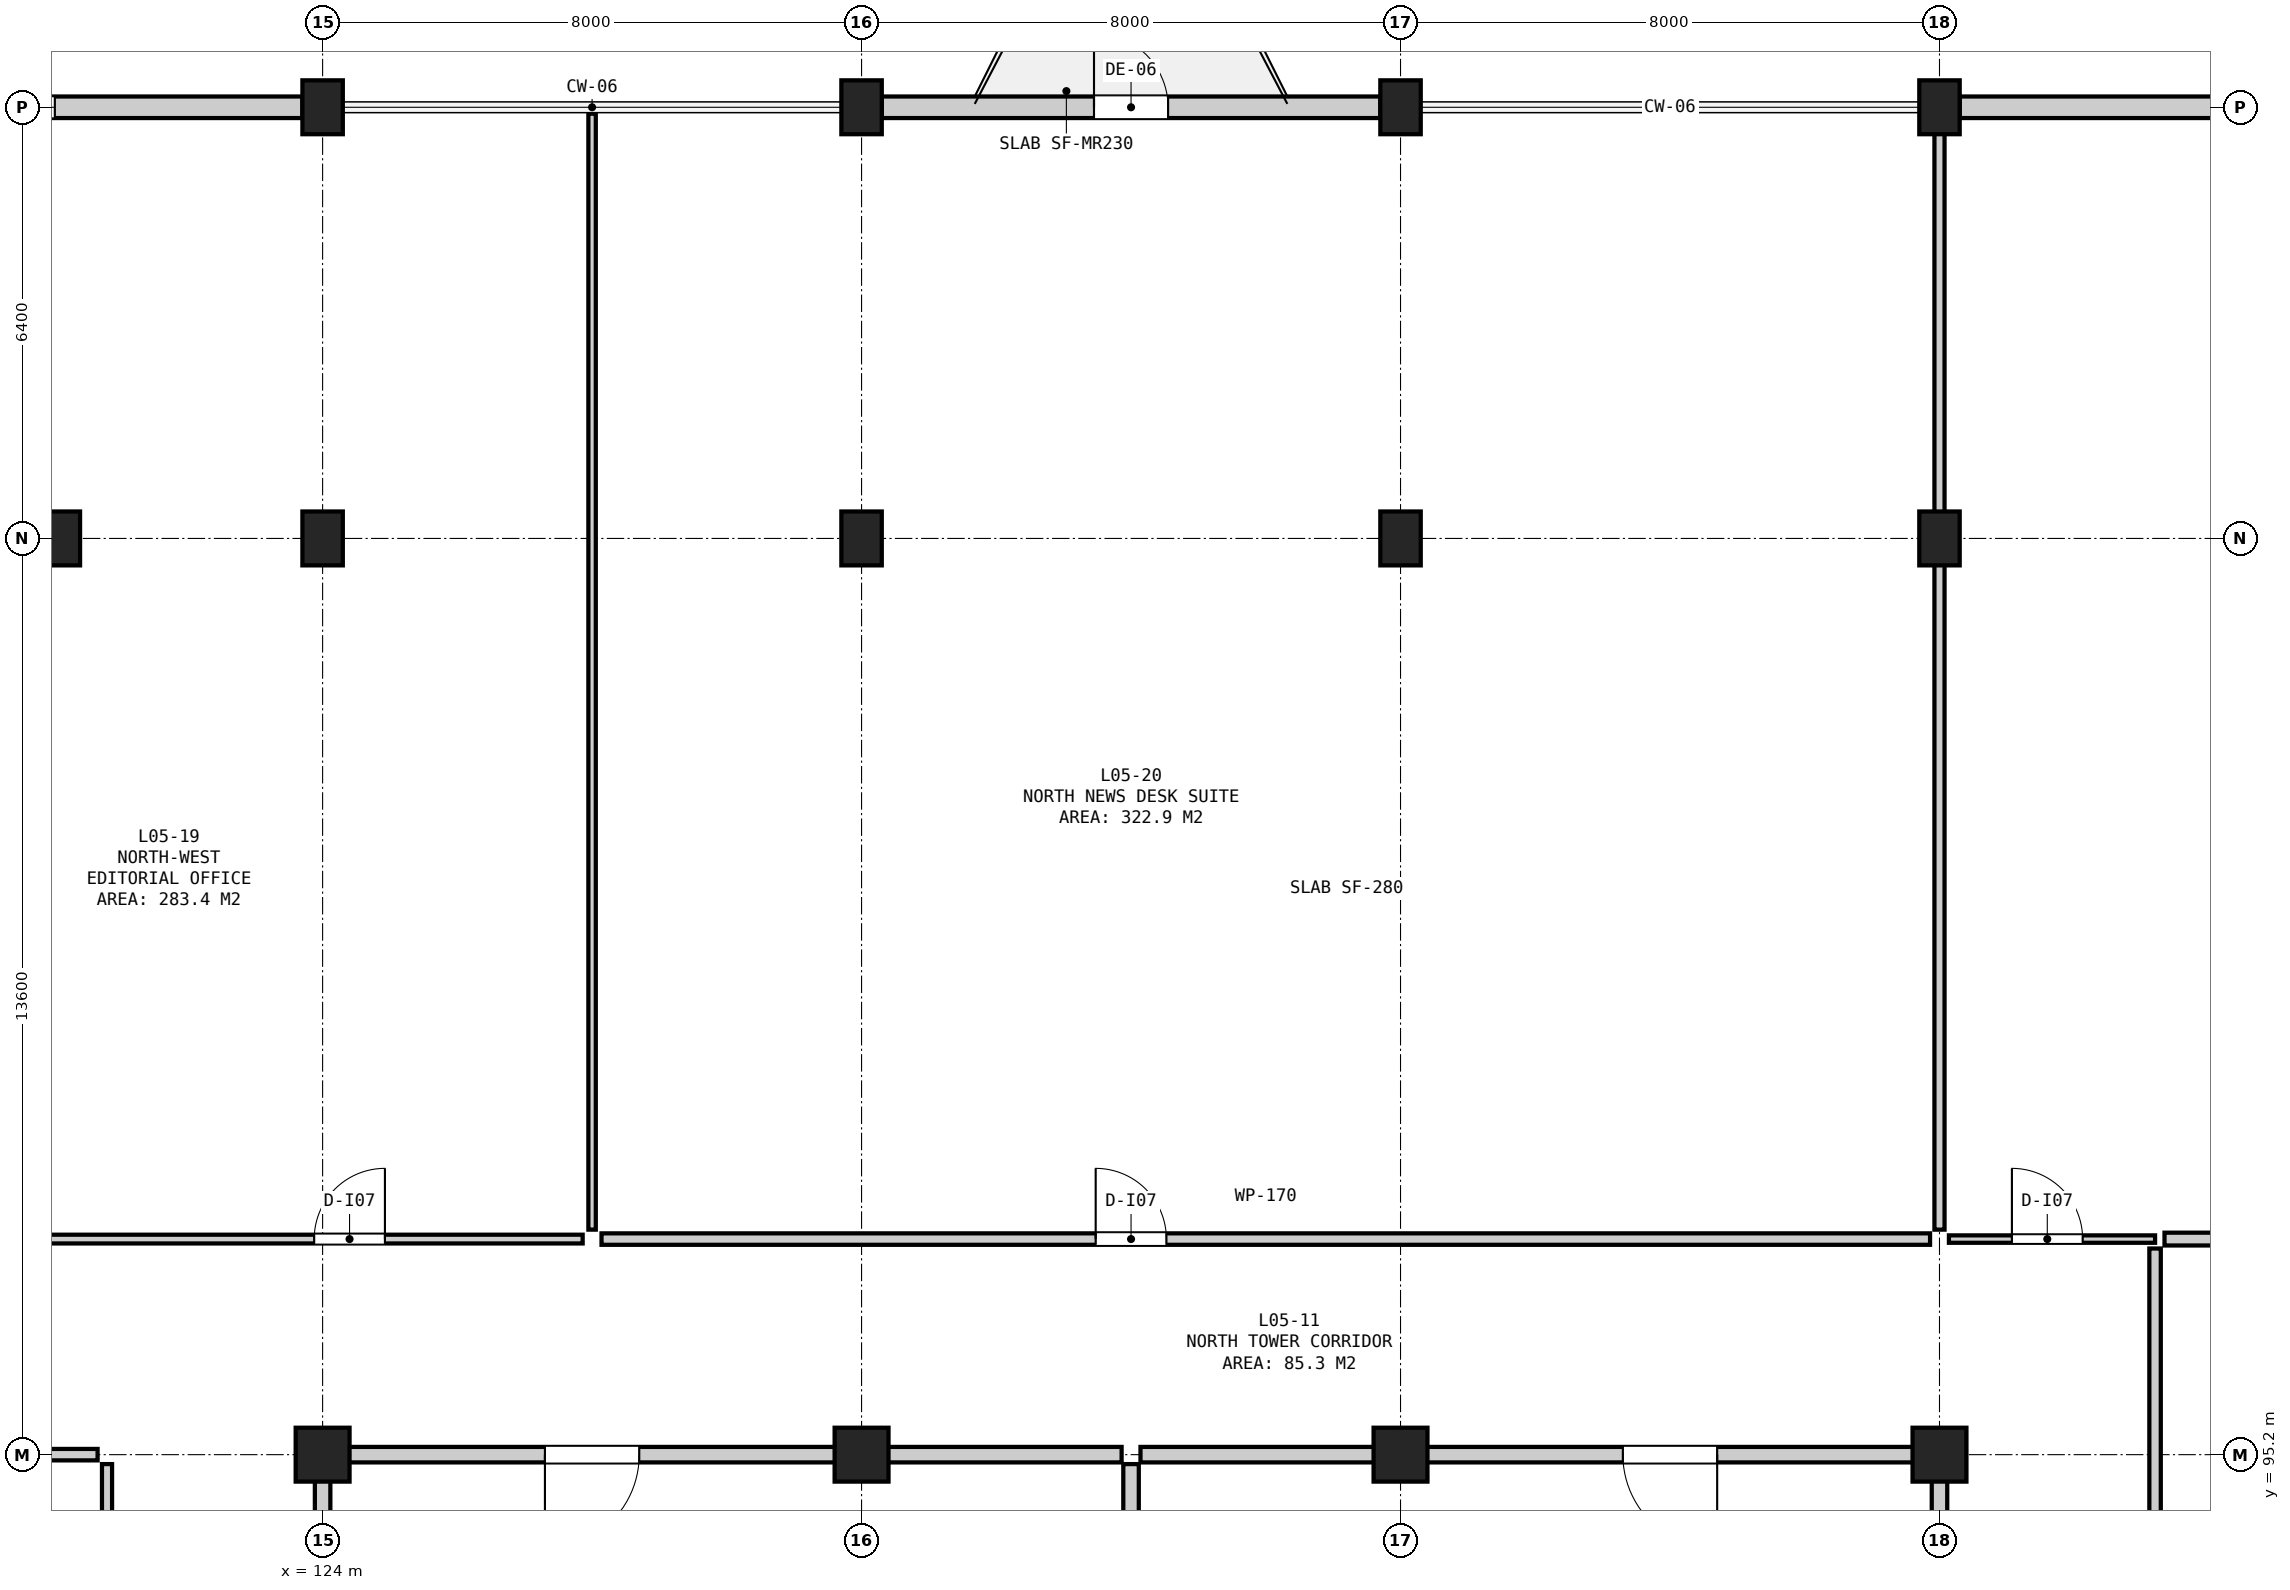
"""IFC4 building model, lengths in metres.
Left out: names, types, materials, properties, quantities, classifications, styles, units other than length and angle.
Written with IfcOpenShell. Run it as: python <this file> out.ifc"""

import sys

from ifc_helpers import new_model, si_unit, direction, frame, frame_2d, origin, origin_2d, place, context, subcontext, project, spatial, rectangle, circle, extrude, element, fill, save


model = new_model("IFC4")
c1 = context("Model", 3, precision=1e-05, world=origin(), true_north=direction((0.0, 1.0)))
c2 = subcontext(c1, "Body", "Model", "MODEL_VIEW")
j1 = project(units=[si_unit("LENGTHUNIT", "METRE"), si_unit("PLANEANGLEUNIT", "RADIAN")], contexts=[c1])
p1 = place(None, origin())
s1 = spatial("IfcSite", under=j1, at=p1, CompositionType="ELEMENT")
p2 = place(p1, origin())
s2 = spatial("IfcBuilding", under=s1, at=p2, CompositionType="ELEMENT")
p3 = place(p2, frame((0.0, 0.0, 23.8)))
s3 = spatial("IfcBuildingStorey", under=s2, at=p3, CompositionType="ELEMENT", Elevation=23.8)
p4 = place(p3, frame((120.0, 108.8, 0.0), z_axis=(0.0, 0.0, 1.0), x_axis=(1.0, 0.0, 0.0)))
e1 = element("IfcColumn", 1, at=p4, inside=s3, PredefinedType="COLUMN", context=c2, shape_type="SweptSolid", body=[
    extrude(circle(Radius=0.4, at=origin_2d()), origin(), (0.0, 0.0, 1.0), 4.0),
])
p5 = place(p3, frame((124.0, 95.2, 0.0), z_axis=(0.0, 0.0, 1.0), x_axis=(1.0, 0.0, 0.0)))
e2 = element("IfcColumn", 2, at=p5, inside=s3, PredefinedType="COLUMN", context=c2, shape_type="SweptSolid", body=[
    extrude(rectangle(XDim=0.8, YDim=0.8, at=origin_2d()), origin(), (0.0, 0.0, 1.0), 4.0),
])
for number, where, z_axis, x_axis in (
    (3, (124.0, 108.8, 0.0), (0.0, 0.0, 1.0), (1.0, 0.0, 0.0)),
    (4, (124.0, 115.2, 0.0), (0.0, 0.0, 1.0), (1.0, 0.0, 0.0)),
):
    element("IfcColumn", number, at=place(p3, frame(where, z_axis=z_axis, x_axis=x_axis)), inside=s3, PredefinedType="COLUMN", context=c2, shape_type="SweptSolid", body=[
        extrude(rectangle(XDim=0.6, YDim=0.8, at=origin_2d()), origin(), (0.0, 0.0, 1.0), 4.0),
    ])
p6 = place(p3, frame((132.0, 95.2, 0.0), z_axis=(0.0, 0.0, 1.0), x_axis=(1.0, 0.0, 0.0)))
e5 = element("IfcColumn", 5, at=p6, inside=s3, PredefinedType="COLUMN", context=c2, shape_type="SweptSolid", body=[
    extrude(rectangle(XDim=0.8, YDim=0.8, at=origin_2d()), origin(), (0.0, 0.0, 1.0), 4.0),
])
for number, where, z_axis, x_axis in (
    (6, (132.0, 108.8, 0.0), (0.0, 0.0, 1.0), (1.0, 0.0, 0.0)),
    (7, (132.0, 115.2, 0.0), (0.0, 0.0, 1.0), (1.0, 0.0, 0.0)),
):
    element("IfcColumn", number, at=place(p3, frame(where, z_axis=z_axis, x_axis=x_axis)), inside=s3, PredefinedType="COLUMN", context=c2, shape_type="SweptSolid", body=[
        extrude(rectangle(XDim=0.6, YDim=0.8, at=origin_2d()), origin(), (0.0, 0.0, 1.0), 4.0),
    ])
p7 = place(p3, frame((140.0, 95.2, 0.0), z_axis=(0.0, 0.0, 1.0), x_axis=(1.0, 0.0, 0.0)))
e8 = element("IfcColumn", 8, at=p7, inside=s3, PredefinedType="COLUMN", context=c2, shape_type="SweptSolid", body=[
    extrude(rectangle(XDim=0.8, YDim=0.8, at=origin_2d()), origin(), (0.0, 0.0, 1.0), 4.0),
])
for number, where, z_axis, x_axis in (
    (9, (140.0, 108.8, 0.0), (0.0, 0.0, 1.0), (1.0, 0.0, 0.0)),
    (10, (140.0, 115.2, 0.0), (0.0, 0.0, 1.0), (1.0, 0.0, 0.0)),
):
    element("IfcColumn", number, at=place(p3, frame(where, z_axis=z_axis, x_axis=x_axis)), inside=s3, PredefinedType="COLUMN", context=c2, shape_type="SweptSolid", body=[
        extrude(rectangle(XDim=0.6, YDim=0.8, at=origin_2d()), origin(), (0.0, 0.0, 1.0), 4.0),
    ])
p8 = place(p3, frame((148.0, 95.2, 0.0), z_axis=(0.0, 0.0, 1.0), x_axis=(1.0, 0.0, 0.0)))
e11 = element("IfcColumn", 11, at=p8, inside=s3, PredefinedType="COLUMN", context=c2, shape_type="SweptSolid", body=[
    extrude(rectangle(XDim=0.8, YDim=0.8, at=origin_2d()), origin(), (0.0, 0.0, 1.0), 4.0),
])
for number, where, z_axis, x_axis in (
    (12, (148.0, 108.8, 0.0), (0.0, 0.0, 1.0), (1.0, 0.0, 0.0)),
    (13, (148.0, 115.2, 0.0), (0.0, 0.0, 1.0), (1.0, 0.0, 0.0)),
):
    element("IfcColumn", number, at=place(p3, frame(where, z_axis=z_axis, x_axis=x_axis)), inside=s3, PredefinedType="COLUMN", context=c2, shape_type="SweptSolid", body=[
        extrude(rectangle(XDim=0.6, YDim=0.8, at=origin_2d()), origin(), (0.0, 0.0, 1.0), 4.0),
    ])
p9 = place(p3, frame((161.3, 115.2, 0.0), z_axis=(0.0, 0.0, 1.0), x_axis=(-1.0, 0.0, 0.0)))
e14 = element("IfcWall", 14, at=p9, inside=s3, PredefinedType="SOLIDWALL", context=c2, shape_type="SweptSolid", body=[
    extrude(rectangle(XDim=13.0, YDim=0.32, at=frame_2d((6.5, 0.0))), origin(), (0.0, 0.0, 1.0), 2.685),
])
p10 = place(p9, frame((6.025, 0.0, 0.8)))
e15 = element("IfcOpeningElement", 15, at=p10, cuts=e14, PredefinedType="OPENING", context=c2, shape_type="SweptSolid", body=[
    extrude(rectangle(XDim=0.95, YDim=1.45, at=frame_2d((0.475, 0.725))), frame((0.0, 0.172, 0.0), z_axis=(0.0, -1.0, 0.0), x_axis=(1.0, 0.0, 0.0)), (0.0, 0.0, 1.0), 0.344),
])
p11 = place(p3, frame((139.7, 115.2, 0.0), z_axis=(0.0, 0.0, 1.0), x_axis=(-1.0, 0.0, 0.0)))
e16 = element("IfcWall", 16, at=p11, inside=s3, PredefinedType="SOLIDWALL", context=c2, shape_type="SweptSolid", body=[
    extrude(rectangle(XDim=7.4, YDim=0.32, at=frame_2d((3.7, 0.0))), origin(), (0.0, 0.0, 1.0), 3.1),
])
p12 = place(p11, frame((3.15, 0.0, 0.0)))
e17 = element("IfcOpeningElement", 17, at=p12, cuts=e16, PredefinedType="OPENING", context=c2, shape_type="SweptSolid", body=[
    extrude(rectangle(XDim=1.1, YDim=2.2, at=frame_2d((0.55, 1.1))), frame((0.0, 0.172, 0.0), z_axis=(0.0, -1.0, 0.0), x_axis=(1.0, 0.0, 0.0)), (0.0, 0.0, 1.0), 0.344),
])
p13 = place(p3, frame((123.7, 115.2, 0.0), z_axis=(0.0, 0.0, 1.0), x_axis=(-1.0, 0.0, 0.0)))
e18 = element("IfcWall", 18, at=p13, inside=s3, PredefinedType="SOLIDWALL", context=c2, shape_type="SweptSolid", body=[
    extrude(rectangle(XDim=6.6, YDim=0.32, at=frame_2d((3.3, 0.0))), origin(), (0.0, 0.0, 1.0), 3.1),
])
p14 = place(p13, frame((3.675, 0.0, 0.9)))
e19 = element("IfcOpeningElement", 19, at=p14, cuts=e18, PredefinedType="OPENING", context=c2, shape_type="SweptSolid", body=[
    extrude(rectangle(XDim=0.95, YDim=1.45, at=frame_2d((0.475, 0.725))), frame((0.0, 0.172, 0.0), z_axis=(0.0, -1.0, 0.0), x_axis=(1.0, 0.0, 0.0)), (0.0, 0.0, 1.0), 0.344),
])
p15 = place(p3, frame((124.14, 95.2, 0.0), z_axis=(0.0, 0.0, 1.0), x_axis=(1.0, 0.0, 0.0)))
e20 = element("IfcWall", 20, at=p15, inside=s3, PredefinedType="SOLIDWALL", context=c2, shape_type="SweptSolid", body=[
    extrude(rectangle(XDim=11.72, YDim=0.23, at=frame_2d((5.86, 0.0))), origin(), (0.0, 0.0, 1.0), 2.945),
])
p16 = place(p15, frame((3.16, 0.0, 0.0)))
e21 = element("IfcOpeningElement", 21, at=p16, cuts=e20, PredefinedType="OPENING", context=c2, shape_type="SweptSolid", body=[
    extrude(rectangle(XDim=1.4, YDim=2.2, at=frame_2d((0.7, 1.1))), frame((0.0, 0.127, 0.0), z_axis=(0.0, -1.0, 0.0), x_axis=(1.0, 0.0, 0.0)), (0.0, 0.0, 1.0), 0.254),
])
p17 = place(p3, frame((124.0, 91.54, 0.0), z_axis=(0.0, 0.0, 1.0), x_axis=(0.0, 1.0, 0.0)))
e22 = element("IfcWall", 22, at=p17, inside=s3, PredefinedType="SOLIDWALL", context=c2, shape_type="SweptSolid", body=[
    extrude(rectangle(XDim=3.52, YDim=0.23, at=frame_2d((1.76, 0.0))), origin(), (0.0, 0.0, 1.0), 3.095),
])
p18 = place(p3, frame((136.0, 91.54, 0.0), z_axis=(0.0, 0.0, 1.0), x_axis=(0.0, 1.0, 0.0)))
e23 = element("IfcWall", 23, at=p18, inside=s3, PredefinedType="SOLIDWALL", context=c2, shape_type="SweptSolid", body=[
    extrude(rectangle(XDim=3.52, YDim=0.23, at=frame_2d((1.76, 0.0))), origin(), (0.0, 0.0, 1.0), 3.72),
])
p19 = place(p3, frame((136.14, 95.2, 0.0), z_axis=(0.0, 0.0, 1.0), x_axis=(1.0, 0.0, 0.0)))
e24 = element("IfcWall", 24, at=p19, inside=s3, PredefinedType="SOLIDWALL", context=c2, shape_type="SweptSolid", body=[
    extrude(rectangle(XDim=11.72, YDim=0.23, at=frame_2d((5.86, 0.0))), origin(), (0.0, 0.0, 1.0), 2.995),
])
p20 = place(p19, frame((7.16, 0.0, 0.0)))
e25 = element("IfcOpeningElement", 25, at=p20, cuts=e24, PredefinedType="OPENING", context=c2, shape_type="SweptSolid", body=[
    extrude(rectangle(XDim=1.4, YDim=2.2, at=frame_2d((0.7, 1.1))), frame((0.0, 0.127, 0.0), z_axis=(0.0, -1.0, 0.0), x_axis=(1.0, 0.0, 0.0)), (0.0, 0.0, 1.0), 0.254),
])
p21 = place(p3, frame((148.0, 91.54, 0.0), z_axis=(0.0, 0.0, 1.0), x_axis=(0.0, 1.0, 0.0)))
e26 = element("IfcWall", 26, at=p21, inside=s3, PredefinedType="SOLIDWALL", context=c2, shape_type="SweptSolid", body=[
    extrude(rectangle(XDim=3.52, YDim=0.23, at=frame_2d((1.76, 0.0))), origin(), (0.0, 0.0, 1.0), 2.945),
])
p22 = place(p3, frame((110.24, 95.2, 0.0), z_axis=(0.0, 0.0, 1.0), x_axis=(1.0, 0.0, 0.0)))
e27 = element("IfcWall", 27, at=p22, inside=s3, PredefinedType="PARTITIONING", context=c2, shape_type="SweptSolid", body=[
    extrude(rectangle(XDim=10.42, YDim=0.17, at=frame_2d((5.21, 0.0))), origin(), (0.0, 0.0, 1.0), 3.195),
])
p23 = place(p3, frame((120.8, 65.775, 0.0), z_axis=(0.0, 0.0, 1.0), x_axis=(0.0, 1.0, 0.0)))
e28 = element("IfcWall", 28, at=p23, inside=s3, PredefinedType="PARTITIONING", context=c2, shape_type="SweptSolid", body=[
    extrude(rectangle(XDim=29.285, YDim=0.15, at=frame_2d((14.643, 0.0))), origin(), (0.0, 0.0, 1.0), 3.72),
])
p24 = place(p23, frame((20.9, 0.0, 0.0)))
e29 = element("IfcOpeningElement", 29, at=p24, cuts=e28, PredefinedType="OPENING", context=c2, shape_type="SweptSolid", body=[
    extrude(rectangle(XDim=1.05, YDim=2.15, at=frame_2d((0.525, 1.075))), frame((0.0, 0.087, 0.0), z_axis=(0.0, -1.0, 0.0), x_axis=(1.0, 0.0, 0.0)), (0.0, 0.0, 1.0), 0.174),
])
p25 = place(p3, frame((151.34, 98.4, 0.0), z_axis=(0.0, 0.0, 1.0), x_axis=(1.0, 0.0, 0.0)))
e30 = element("IfcWall", 30, at=p25, inside=s3, PredefinedType="PARTITIONING", context=c2, shape_type="SweptSolid", body=[
    extrude(rectangle(XDim=16.565, YDim=0.19, at=frame_2d((8.282, 0.0))), origin(), (0.0, 0.0, 1.0), 3.72),
])
p26 = place(p3, frame((151.2, 86.54, 0.0), z_axis=(0.0, 0.0, 1.0), x_axis=(0.0, 1.0, 0.0)))
e31 = element("IfcWall", 31, at=p26, inside=s3, PredefinedType="PARTITIONING", context=c2, shape_type="SweptSolid", body=[
    extrude(rectangle(XDim=11.72, YDim=0.17, at=frame_2d((5.86, 0.0))), origin(), (0.0, 0.0, 1.0), 3.72),
])
p27 = place(p26, frame((4.435, 0.0, 0.0)))
e32 = element("IfcOpeningElement", 32, at=p27, cuts=e31, PredefinedType="OPENING", context=c2, shape_type="SweptSolid", body=[
    extrude(rectangle(XDim=1.05, YDim=2.15, at=frame_2d((0.525, 1.075))), frame((0.0, 0.097, 0.0), z_axis=(0.0, -1.0, 0.0), x_axis=(1.0, 0.0, 0.0)), (0.0, 0.0, 1.0), 0.194),
])
p28 = place(p3, frame((110.495, 98.4, 0.0), z_axis=(0.0, 0.0, 1.0), x_axis=(1.0, 0.0, 0.0)))
e33 = element("IfcWall", 33, at=p28, inside=s3, PredefinedType="PARTITIONING", context=c2, shape_type="SweptSolid", body=[
    extrude(rectangle(XDim=17.365, YDim=0.13, at=frame_2d((8.683, 0.0))), origin(), (0.0, 0.0, 1.0), 3.72),
])
p29 = place(p28, frame((13.38, 0.0, 0.0)))
e34 = element("IfcOpeningElement", 34, at=p29, cuts=e33, PredefinedType="OPENING", context=c2, shape_type="SweptSolid", body=[
    extrude(rectangle(XDim=1.05, YDim=2.15, at=frame_2d((0.525, 1.075))), frame((0.0, 0.077, 0.0), z_axis=(0.0, -1.0, 0.0), x_axis=(1.0, 0.0, 0.0)), (0.0, 0.0, 1.0), 0.154),
])
p30 = place(p3, frame((128.0, 98.54, 0.0), z_axis=(0.0, 0.0, 1.0), x_axis=(0.0, 1.0, 0.0)))
e35 = element("IfcWall", 35, at=p30, inside=s3, PredefinedType="PARTITIONING", context=c2, shape_type="SweptSolid", body=[
    extrude(rectangle(XDim=16.565, YDim=0.11, at=frame_2d((8.282, 0.0))), origin(), (0.0, 0.0, 1.0), 3.72),
])
p31 = place(p3, frame((128.14, 98.4, 0.0), z_axis=(0.0, 0.0, 1.0), x_axis=(1.0, 0.0, 0.0)))
e36 = element("IfcWall", 36, at=p31, inside=s3, PredefinedType="PARTITIONING", context=c2, shape_type="SweptSolid", body=[
    extrude(rectangle(XDim=19.72, YDim=0.17, at=frame_2d((9.86, 0.0))), origin(), (0.0, 0.0, 1.0), 3.72),
])
p32 = place(p31, frame((7.335, 0.0, 0.0)))
e37 = element("IfcOpeningElement", 37, at=p32, cuts=e36, PredefinedType="OPENING", context=c2, shape_type="SweptSolid", body=[
    extrude(rectangle(XDim=1.05, YDim=2.15, at=frame_2d((0.525, 1.075))), frame((0.0, 0.097, 0.0), z_axis=(0.0, -1.0, 0.0), x_axis=(1.0, 0.0, 0.0)), (0.0, 0.0, 1.0), 0.194),
])
p33 = place(p3, frame((148.0, 98.54, 0.0), z_axis=(0.0, 0.0, 1.0), x_axis=(0.0, 1.0, 0.0)))
e38 = element("IfcWall", 38, at=p33, inside=s3, PredefinedType="PARTITIONING", context=c2, shape_type="SweptSolid", body=[
    extrude(rectangle(XDim=16.485, YDim=0.15, at=frame_2d((8.242, 0.0))), origin(), (0.0, 0.0, 1.0), 2.645),
])
p34 = place(p3, frame((148.14, 98.4, 0.0), z_axis=(0.0, 0.0, 1.0), x_axis=(1.0, 0.0, 0.0)))
e39 = element("IfcWall", 39, at=p34, inside=s3, PredefinedType="PARTITIONING", context=c2, shape_type="SweptSolid", body=[
    extrude(rectangle(XDim=3.06, YDim=0.11, at=frame_2d((1.53, 0.0))), origin(), (0.0, 0.0, 1.0), 3.72),
])
p35 = place(p34, frame((0.935, 0.0, 0.0)))
e40 = element("IfcOpeningElement", 40, at=p35, cuts=e39, PredefinedType="OPENING", context=c2, shape_type="SweptSolid", body=[
    extrude(rectangle(XDim=1.05, YDim=2.15, at=frame_2d((0.525, 1.075))), frame((0.0, 0.067, 0.0), z_axis=(0.0, -1.0, 0.0), x_axis=(1.0, 0.0, 0.0)), (0.0, 0.0, 1.0), 0.134),
])
p36 = place(p12, frame((1.1, 0.0, 0.0), z_axis=(0.0, 0.0, 1.0), x_axis=(-1.0, 0.0, 0.0)))
e41 = element("IfcDoor", 41, at=p36, inside=s3, OperationType="SINGLE_SWING_LEFT", PredefinedType="DOOR", context=c2, shape_type="SweptSolid", body=[
    extrude(rectangle(XDim=1.1, YDim=2.2, at=frame_2d((0.55, 1.1))), frame((0.0, 0.025, 0.0), z_axis=(0.0, -1.0, 0.0), x_axis=(1.0, 0.0, 0.0)), (0.0, 0.0, 1.0), 0.05),
])
fill(e17, e41)
p37 = place(p14, origin())
e42 = element("IfcWindow", 42, at=p37, inside=s3, PartitioningType="SINGLE_PANEL", PredefinedType="WINDOW", context=c2, shape_type="SweptSolid", body=[
    extrude(rectangle(XDim=0.95, YDim=1.45, at=frame_2d((0.475, 0.725))), frame((0.0, 0.03, 0.0), z_axis=(0.0, -1.0, 0.0), x_axis=(1.0, 0.0, 0.0)), (0.0, 0.0, 1.0), 0.06),
])
fill(e19, e42)
p38 = place(p16, frame((1.4, 0.0, 0.0), z_axis=(0.0, 0.0, 1.0), x_axis=(-1.0, 0.0, 0.0)))
e43 = element("IfcDoor", 43, at=p38, inside=s3, OperationType="SINGLE_SWING_RIGHT", PredefinedType="DOOR", context=c2, shape_type="SweptSolid", body=[
    extrude(rectangle(XDim=1.4, YDim=2.2, at=frame_2d((0.7, 1.1))), frame((0.0, 0.025, 0.0), z_axis=(0.0, -1.0, 0.0), x_axis=(1.0, 0.0, 0.0)), (0.0, 0.0, 1.0), 0.05),
])
fill(e21, e43)
p39 = place(p20, frame((1.4, 0.0, 0.0), z_axis=(0.0, 0.0, 1.0), x_axis=(-1.0, 0.0, 0.0)))
e44 = element("IfcDoor", 44, at=p39, inside=s3, OperationType="SINGLE_SWING_LEFT", PredefinedType="DOOR", context=c2, shape_type="SweptSolid", body=[
    extrude(rectangle(XDim=1.4, YDim=2.2, at=frame_2d((0.7, 1.1))), frame((0.0, 0.025, 0.0), z_axis=(0.0, -1.0, 0.0), x_axis=(1.0, 0.0, 0.0)), (0.0, 0.0, 1.0), 0.05),
])
fill(e25, e44)
p40 = place(p29, origin())
e45 = element("IfcDoor", 45, at=p40, inside=s3, OperationType="SINGLE_SWING_RIGHT", PredefinedType="DOOR", context=c2, shape_type="SweptSolid", body=[
    extrude(rectangle(XDim=1.05, YDim=2.15, at=frame_2d((0.525, 1.075))), frame((0.0, 0.025, 0.0), z_axis=(0.0, -1.0, 0.0), x_axis=(1.0, 0.0, 0.0)), (0.0, 0.0, 1.0), 0.05),
])
fill(e34, e45)
p41 = place(p32, origin())
e46 = element("IfcDoor", 46, at=p41, inside=s3, OperationType="SINGLE_SWING_LEFT", PredefinedType="DOOR", context=c2, shape_type="SweptSolid", body=[
    extrude(rectangle(XDim=1.05, YDim=2.15, at=frame_2d((0.525, 1.075))), frame((0.0, 0.025, 0.0), z_axis=(0.0, -1.0, 0.0), x_axis=(1.0, 0.0, 0.0)), (0.0, 0.0, 1.0), 0.05),
])
fill(e37, e46)
p42 = place(p35, origin())
e47 = element("IfcDoor", 47, at=p42, inside=s3, OperationType="SINGLE_SWING_LEFT", PredefinedType="DOOR", context=c2, shape_type="SweptSolid", body=[
    extrude(rectangle(XDim=1.05, YDim=2.15, at=frame_2d((0.525, 1.075))), frame((0.0, 0.025, 0.0), z_axis=(0.0, -1.0, 0.0), x_axis=(1.0, 0.0, 0.0)), (0.0, 0.0, 1.0), 0.05),
])
fill(e40, e47)
save(model, sys.argv[1])
